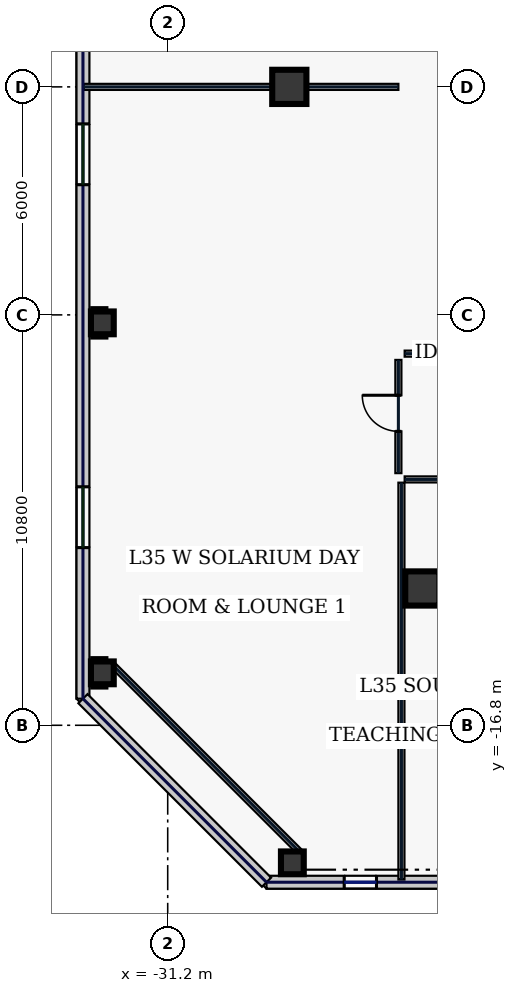
"""IFC4 building model, lengths in metres.
Left out: names, types, materials, properties, quantities, classifications, styles, units other than length and angle.
Written with IfcOpenShell. Run it as: python <this file> out.ifc"""

import sys

from ifc_helpers import new_model, si_unit, direction, frame, frame_2d, origin, origin_2d, place, context, subcontext, project, spatial, rectangle, hollow_rectangle, extrude, element, fill, save


model = new_model("IFC4")
c1 = context("Model", 3, precision=1e-05, world=origin(), true_north=direction((0.0, 1.0)))
c2 = subcontext(c1, "Body", "Model", "MODEL_VIEW")
j1 = project(units=[si_unit("LENGTHUNIT", "METRE"), si_unit("PLANEANGLEUNIT", "RADIAN")], contexts=[c1])
p1 = place(None, origin())
s1 = spatial("IfcSite", under=j1, at=p1, CompositionType="ELEMENT")
p2 = place(p1, origin())
s2 = spatial("IfcBuilding", under=s1, at=p2, CompositionType="ELEMENT")
p3 = place(p2, frame((0.0, 0.0, 156.2)))
s3 = spatial("IfcBuildingStorey", under=s2, at=p3, CompositionType="ELEMENT", Elevation=156.2)
for number, where, z_axis, x_axis in (
    (1, (-24.5, -13.2, 0.0), (0.0, 0.0, 1.0), (1.0, 0.0, 0.0)),
    (2, (-28.0, 0.0, 0.0), (0.0, 0.0, 1.0), (1.0, 0.0, 0.0)),
):
    element("IfcColumn", number, at=place(p3, frame(where, z_axis=z_axis, x_axis=x_axis)), inside=s3, PredefinedType="COLUMN", context=c2, shape_type="SweptSolid", body=[
        extrude(hollow_rectangle(XDim=0.9, YDim=0.9, WallThickness=0.04, at=origin_2d()), origin(), (0.0, 0.0, 1.0), 3.74),
    ])
for number, where, z_axis, x_axis in (
    (3, (-27.92, -20.42, 0.0), (0.0, 0.0, 1.0), (1.0, 0.0, 0.0)),
    (4, (-32.92, -6.21, 0.0), (0.0, 0.0, 1.0), (1.0, 0.0, 0.0)),
    (5, (-32.92, -15.42, 0.0), (0.0, 0.0, 1.0), (1.0, 0.0, 0.0)),
):
    element("IfcColumn", number, at=place(p3, frame(where, z_axis=z_axis, x_axis=x_axis)), inside=s3, PredefinedType="COLUMN", context=c2, shape_type="SweptSolid", body=[
        extrude(hollow_rectangle(XDim=0.6, YDim=0.6, WallThickness=0.028, at=origin_2d()), origin(), (0.0, 0.0, 1.0), 3.74),
    ])
p4 = place(p3, frame((-28.6, -20.93, 0.0), z_axis=(0.0, 0.0, 1.0), x_axis=(1.0, 0.0, 0.0)))
e6 = element("IfcWall", 6, at=p4, inside=s3, PredefinedType="STANDARD", context=c2, shape_type="SweptSolid", body=[
    extrude(rectangle(XDim=15.95, YDim=0.34, at=frame_2d((7.975, 0.0))), origin(), (0.0, 0.0, 1.0), 3.74),
])
p5 = place(p4, frame((2.044, 0.0, 0.8)))
e7 = element("IfcOpeningElement", 7, at=p5, cuts=e6, PredefinedType="OPENING", context=c2, shape_type="SweptSolid", body=[
    extrude(rectangle(XDim=0.85, YDim=1.85, at=frame_2d((0.425, 0.925))), frame((0.0, 0.18, 0.0), z_axis=(0.0, -1.0, 0.0), x_axis=(1.0, 0.0, 0.0)), (0.0, 0.0, 1.0), 0.36),
])
p6 = place(p4, frame((6.029, 0.0, 0.8)))
e8 = element("IfcOpeningElement", 8, at=p6, cuts=e6, PredefinedType="OPENING", context=c2, shape_type="SweptSolid", body=[
    extrude(rectangle(XDim=0.85, YDim=1.85, at=frame_2d((0.425, 0.925))), frame((0.0, 0.18, 0.0), z_axis=(0.0, -1.0, 0.0), x_axis=(1.0, 0.0, 0.0)), (0.0, 0.0, 1.0), 0.36),
])
p7 = place(p4, frame((10.707, 0.0, 0.8)))
e9 = element("IfcOpeningElement", 9, at=p7, cuts=e6, PredefinedType="OPENING", context=c2, shape_type="SweptSolid", body=[
    extrude(rectangle(XDim=1.95, YDim=2.1, at=frame_2d((0.975, 1.05))), frame((0.0, 0.18, 0.0), z_axis=(0.0, -1.0, 0.0), x_axis=(1.0, 0.0, 0.0)), (0.0, 0.0, 1.0), 0.36),
])
p8 = place(p3, frame((-33.43, 22.1, 0.0), z_axis=(0.0, 0.0, 1.0), x_axis=(0.0, -1.0, 0.0)))
e10 = element("IfcWall", 10, at=p8, inside=s3, PredefinedType="STANDARD", context=c2, shape_type="SweptSolid", body=[
    extrude(rectangle(XDim=38.2, YDim=0.34, at=frame_2d((19.1, 0.0))), origin(), (0.0, 0.0, 1.0), 3.74),
])
p9 = place(p8, frame((3.975, 0.0, 0.58)))
e11 = element("IfcOpeningElement", 11, at=p9, cuts=e10, PredefinedType="OPENING", context=c2, shape_type="SweptSolid", body=[
    extrude(rectangle(XDim=1.6, YDim=2.3, at=frame_2d((0.8, 1.15))), frame((0.0, 0.18, 0.0), z_axis=(0.0, -1.0, 0.0), x_axis=(1.0, 0.0, 0.0)), (0.0, 0.0, 1.0), 0.36),
])
p10 = place(p8, frame((13.525, 0.0, 0.58)))
e12 = element("IfcOpeningElement", 12, at=p10, cuts=e10, PredefinedType="OPENING", context=c2, shape_type="SweptSolid", body=[
    extrude(rectangle(XDim=1.6, YDim=2.3, at=frame_2d((0.8, 1.15))), frame((0.0, 0.18, 0.0), z_axis=(0.0, -1.0, 0.0), x_axis=(1.0, 0.0, 0.0)), (0.0, 0.0, 1.0), 0.36),
])
p11 = place(p8, frame((23.075, 0.0, 0.58)))
e13 = element("IfcOpeningElement", 13, at=p11, cuts=e10, PredefinedType="OPENING", context=c2, shape_type="SweptSolid", body=[
    extrude(rectangle(XDim=1.6, YDim=2.3, at=frame_2d((0.8, 1.15))), frame((0.0, 0.18, 0.0), z_axis=(0.0, -1.0, 0.0), x_axis=(1.0, 0.0, 0.0)), (0.0, 0.0, 1.0), 0.36),
])
p12 = place(p8, frame((32.625, 0.0, 0.58)))
e14 = element("IfcOpeningElement", 14, at=p12, cuts=e10, PredefinedType="OPENING", context=c2, shape_type="SweptSolid", body=[
    extrude(rectangle(XDim=1.6, YDim=2.3, at=frame_2d((0.8, 1.15))), frame((0.0, 0.18, 0.0), z_axis=(0.0, -1.0, 0.0), x_axis=(1.0, 0.0, 0.0)), (0.0, 0.0, 1.0), 0.36),
])
p13 = place(p3, frame((-33.43, -16.1, 0.0), z_axis=(0.0, 0.0, 1.0), x_axis=(0.707106781187, -0.707106781187, 0.0)))
e15 = element("IfcWall", 15, at=p13, inside=s3, PredefinedType="STANDARD", context=c2, shape_type="SweptSolid", body=[
    extrude(rectangle(XDim=6.83, YDim=0.34, at=frame_2d((3.415, 0.0))), origin(), (0.0, 0.0, 1.0), 3.74),
])
p14 = place(p3, frame((-32.68, -15.18, 0.0), z_axis=(0.0, 0.0, 1.0), x_axis=(0.707106781187, -0.707106781187, 0.0)))
e16 = element("IfcWall", 16, at=p14, inside=s3, PredefinedType="PARTITIONING", context=c2, shape_type="SweptSolid", body=[
    extrude(rectangle(XDim=7.071, YDim=0.16, at=frame_2d((3.536, 0.0))), origin(), (0.0, 0.0, 1.0), 3.74),
])
p15 = place(p3, frame((-25.13, -10.165, 0.0), z_axis=(0.0, 0.0, 1.0), x_axis=(0.0, 1.0, 0.0)))
e17 = element("IfcWall", 17, at=p15, inside=s3, PredefinedType="PARTITIONING", context=c2, shape_type="SweptSolid", body=[
    extrude(rectangle(XDim=2.98, YDim=0.16, at=frame_2d((1.49, 0.0))), origin(), (0.0, 0.0, 1.0), 3.74),
])
p16 = place(p15, frame((1.1, 0.0, 0.0)))
e18 = element("IfcOpeningElement", 18, at=p16, cuts=e17, PredefinedType="OPENING", context=c2, shape_type="SweptSolid", body=[
    extrude(rectangle(XDim=0.95, YDim=2.2, at=frame_2d((0.475, 1.1))), frame((0.0, 0.09, 0.0), z_axis=(0.0, -1.0, 0.0), x_axis=(1.0, 0.0, 0.0)), (0.0, 0.0, 1.0), 0.18),
])
p17 = place(p3, frame((-24.965, -7.02, 0.0), z_axis=(0.0, 0.0, 1.0), x_axis=(1.0, 0.0, 0.0)))
e19 = element("IfcWall", 19, at=p17, inside=s3, PredefinedType="PARTITIONING", context=c2, shape_type="SweptSolid", body=[
    extrude(rectangle(XDim=14.25, YDim=0.16, at=frame_2d((7.125, 0.0))), origin(), (0.0, 0.0, 1.0), 3.74),
])
p18 = place(p3, frame((24.965, -10.33, 0.0), z_axis=(0.0, 0.0, 1.0), x_axis=(-1.0, 0.0, 0.0)))
e20 = element("IfcWall", 20, at=p18, inside=s3, PredefinedType="PARTITIONING", context=c2, shape_type="SweptSolid", body=[
    extrude(rectangle(XDim=49.93, YDim=0.16, at=frame_2d((24.965, 0.0))), origin(), (0.0, 0.0, 1.0), 3.74),
])
p19 = place(p18, frame((47.106, 0.0, 0.0)))
e21 = element("IfcOpeningElement", 21, at=p19, cuts=e20, PredefinedType="OPENING", context=c2, shape_type="SweptSolid", body=[
    extrude(rectangle(XDim=1.15, YDim=2.2, at=frame_2d((0.575, 1.1))), frame((0.0, 0.09, 0.0), z_axis=(0.0, -1.0, 0.0), x_axis=(1.0, 0.0, 0.0)), (0.0, 0.0, 1.0), 0.18),
])
p20 = place(p18, frame((41.6, 0.0, 0.0)))
e22 = element("IfcOpeningElement", 22, at=p20, cuts=e20, PredefinedType="OPENING", context=c2, shape_type="SweptSolid", body=[
    extrude(rectangle(XDim=0.95, YDim=2.2, at=frame_2d((0.475, 1.1))), frame((0.0, 0.09, 0.0), z_axis=(0.0, -1.0, 0.0), x_axis=(1.0, 0.0, 0.0)), (0.0, 0.0, 1.0), 0.18),
])
p21 = place(p18, frame((32.4, 0.0, 0.0)))
e23 = element("IfcOpeningElement", 23, at=p21, cuts=e20, PredefinedType="OPENING", context=c2, shape_type="SweptSolid", body=[
    extrude(rectangle(XDim=0.95, YDim=2.2, at=frame_2d((0.475, 1.1))), frame((0.0, 0.09, 0.0), z_axis=(0.0, -1.0, 0.0), x_axis=(1.0, 0.0, 0.0)), (0.0, 0.0, 1.0), 0.18),
])
p22 = place(p18, frame((22.475, 0.0, 0.0)))
e24 = element("IfcOpeningElement", 24, at=p22, cuts=e20, PredefinedType="OPENING", context=c2, shape_type="SweptSolid", body=[
    extrude(rectangle(XDim=0.95, YDim=2.2, at=frame_2d((0.475, 1.1))), frame((0.0, 0.09, 0.0), z_axis=(0.0, -1.0, 0.0), x_axis=(1.0, 0.0, 0.0)), (0.0, 0.0, 1.0), 0.18),
])
p23 = place(p18, frame((14.375, 0.0, 0.0)))
e25 = element("IfcOpeningElement", 25, at=p23, cuts=e20, PredefinedType="OPENING", context=c2, shape_type="SweptSolid", body=[
    extrude(rectangle(XDim=1.05, YDim=2.2, at=frame_2d((0.525, 1.1))), frame((0.0, 0.09, 0.0), z_axis=(0.0, -1.0, 0.0), x_axis=(1.0, 0.0, 0.0)), (0.0, 0.0, 1.0), 0.18),
])
p24 = place(p18, frame((7.275, 0.0, 0.0)))
e26 = element("IfcOpeningElement", 26, at=p24, cuts=e20, PredefinedType="OPENING", context=c2, shape_type="SweptSolid", body=[
    extrude(rectangle(XDim=0.95, YDim=2.2, at=frame_2d((0.475, 1.1))), frame((0.0, 0.09, 0.0), z_axis=(0.0, -1.0, 0.0), x_axis=(1.0, 0.0, 0.0)), (0.0, 0.0, 1.0), 0.18),
])
p25 = place(p18, frame((2.044, 0.0, 0.0)))
e27 = element("IfcOpeningElement", 27, at=p25, cuts=e20, PredefinedType="OPENING", context=c2, shape_type="SweptSolid", body=[
    extrude(rectangle(XDim=0.95, YDim=2.2, at=frame_2d((0.475, 1.1))), frame((0.0, 0.09, 0.0), z_axis=(0.0, -1.0, 0.0), x_axis=(1.0, 0.0, 0.0)), (0.0, 0.0, 1.0), 0.18),
])
p26 = place(p3, frame((-25.05, -20.86, 0.0), z_axis=(0.0, 0.0, 1.0), x_axis=(0.0, 1.0, 0.0)))
e28 = element("IfcWall", 28, at=p26, inside=s3, PredefinedType="PARTITIONING", context=c2, shape_type="SweptSolid", body=[
    extrude(rectangle(XDim=10.445, YDim=0.16, at=frame_2d((5.223, 0.0))), origin(), (0.0, 0.0, 1.0), 3.74),
])
p27 = place(p3, frame((-33.41, 0.0, 0.0), z_axis=(0.0, 0.0, 1.0), x_axis=(1.0, 0.0, 0.0)))
e29 = element("IfcWall", 29, at=p27, inside=s3, PredefinedType="PARTITIONING", context=c2, shape_type="SweptSolid", body=[
    extrude(rectangle(XDim=8.28, YDim=0.16, at=frame_2d((4.14, 0.0))), origin(), (0.0, 0.0, 1.0), 3.74),
])
p28 = place(p5, origin())
e30 = element("IfcWindow", 30, at=p28, inside=s3, PartitioningType="SINGLE_PANEL", PredefinedType="WINDOW", context=c2, shape_type="SweptSolid", body=[
    extrude(rectangle(XDim=0.85, YDim=1.85, at=frame_2d((0.425, 0.925))), frame((0.0, 0.03, 0.0), z_axis=(0.0, -1.0, 0.0), x_axis=(1.0, 0.0, 0.0)), (0.0, 0.0, 1.0), 0.06),
])
fill(e7, e30)
p29 = place(p11, origin())
e31 = element("IfcWindow", 31, at=p29, inside=s3, PartitioningType="SINGLE_PANEL", PredefinedType="WINDOW", context=c2, shape_type="SweptSolid", body=[
    extrude(rectangle(XDim=1.6, YDim=2.3, at=frame_2d((0.8, 1.15))), frame((0.0, 0.03, 0.0), z_axis=(0.0, -1.0, 0.0), x_axis=(1.0, 0.0, 0.0)), (0.0, 0.0, 1.0), 0.06),
])
fill(e13, e31)
p30 = place(p12, origin())
e32 = element("IfcWindow", 32, at=p30, inside=s3, PartitioningType="SINGLE_PANEL", PredefinedType="WINDOW", context=c2, shape_type="SweptSolid", body=[
    extrude(rectangle(XDim=1.6, YDim=2.3, at=frame_2d((0.8, 1.15))), frame((0.0, 0.03, 0.0), z_axis=(0.0, -1.0, 0.0), x_axis=(1.0, 0.0, 0.0)), (0.0, 0.0, 1.0), 0.06),
])
fill(e14, e32)
p31 = place(p16, origin())
e33 = element("IfcDoor", 33, at=p31, inside=s3, OperationType="SINGLE_SWING_RIGHT", PredefinedType="DOOR", context=c2, shape_type="SweptSolid", body=[
    extrude(rectangle(XDim=0.95, YDim=2.2, at=frame_2d((0.475, 1.1))), frame((0.0, 0.025, 0.0), z_axis=(0.0, -1.0, 0.0), x_axis=(1.0, 0.0, 0.0)), (0.0, 0.0, 1.0), 0.05),
])
fill(e18, e33)
save(model, sys.argv[1])
